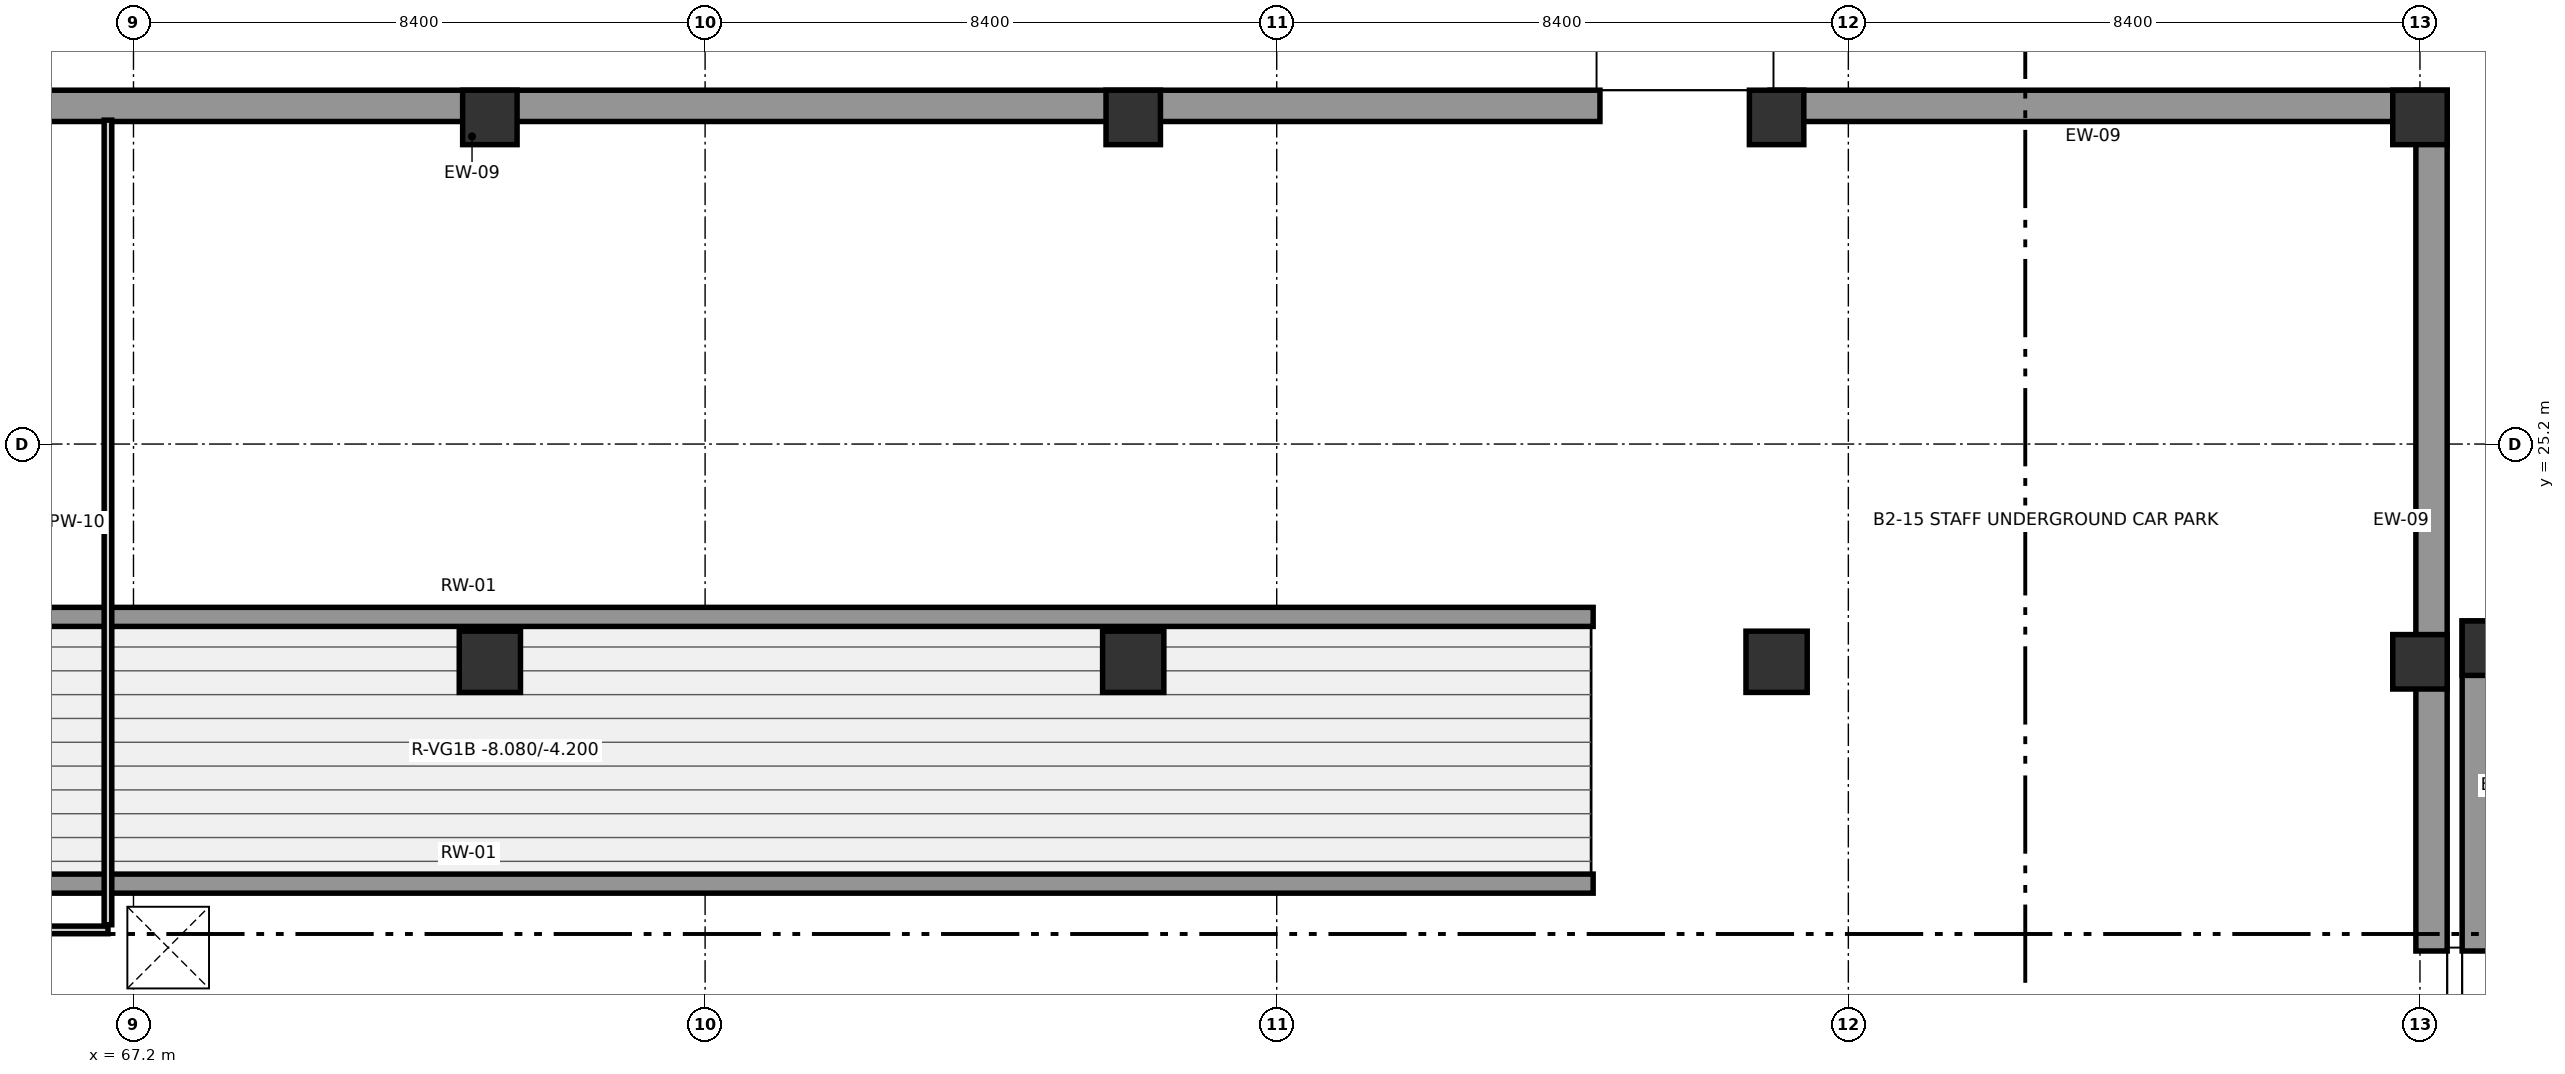
"""IFC4 building model, lengths in metres.
Left out: names, types, materials, properties, quantities, classifications, styles, units other than length and angle.
Written with IfcOpenShell. Run it as: python <this file> out.ifc"""

import sys

from ifc_helpers import new_model, si_unit, direction, frame, frame_2d, origin, origin_2d, place, context, subcontext, project, spatial, rectangle, extrude, element, save


model = new_model("IFC4")
c1 = context("Model", 3, precision=1e-05, world=origin(), true_north=direction((0.0, 1.0)))
c2 = subcontext(c1, "Body", "Model", "MODEL_VIEW")
j1 = project(units=[si_unit("LENGTHUNIT", "METRE"), si_unit("PLANEANGLEUNIT", "RADIAN")], contexts=[c1])
p1 = place(None, origin())
s1 = spatial("IfcSite", under=j1, at=p1, CompositionType="ELEMENT")
p2 = place(p1, origin())
s2 = spatial("IfcBuilding", under=s1, at=p2, CompositionType="ELEMENT")
p3 = place(p2, frame((0.0, 0.0, -8.4)))
s3 = spatial("IfcBuildingStorey", under=s2, at=p3, CompositionType="ELEMENT", Elevation=-8.4)
p4 = place(p3, frame((72.437, 22.0, 0.0), z_axis=(0.0, 0.0, 1.0), x_axis=(1.0, 0.0, 0.0)))
e1 = element("IfcColumn", 1, at=p4, inside=s3, PredefinedType="COLUMN", context=c2, shape_type="SweptSolid", body=[
    extrude(rectangle(XDim=0.9, YDim=0.9, at=origin_2d()), origin(), (0.0, 0.0, 1.0), 4.2),
])
p5 = place(p3, frame((72.437, 30.0, 0.0), z_axis=(0.0, 0.0, 1.0), x_axis=(1.0, 0.0, 0.0)))
e2 = element("IfcColumn", 2, at=p5, inside=s3, PredefinedType="COLUMN", context=c2, shape_type="SweptSolid", body=[
    extrude(rectangle(XDim=0.8, YDim=0.8, at=origin_2d()), origin(), (0.0, 0.0, 1.0), 4.2),
])
p6 = place(p3, frame((81.891, 22.0, 0.0), z_axis=(0.0, 0.0, 1.0), x_axis=(1.0, 0.0, 0.0)))
e3 = element("IfcColumn", 3, at=p6, inside=s3, PredefinedType="COLUMN", context=c2, shape_type="SweptSolid", body=[
    extrude(rectangle(XDim=0.9, YDim=0.9, at=origin_2d()), origin(), (0.0, 0.0, 1.0), 4.2),
])
p7 = place(p3, frame((81.891, 30.0, 0.0), z_axis=(0.0, 0.0, 1.0), x_axis=(1.0, 0.0, 0.0)))
e4 = element("IfcColumn", 4, at=p7, inside=s3, PredefinedType="COLUMN", context=c2, shape_type="SweptSolid", body=[
    extrude(rectangle(XDim=0.8, YDim=0.8, at=origin_2d()), origin(), (0.0, 0.0, 1.0), 4.2),
])
p8 = place(p3, frame((91.346, 22.0, 0.0), z_axis=(0.0, 0.0, 1.0), x_axis=(1.0, 0.0, 0.0)))
e5 = element("IfcColumn", 5, at=p8, inside=s3, PredefinedType="COLUMN", context=c2, shape_type="SweptSolid", body=[
    extrude(rectangle(XDim=0.9, YDim=0.9, at=origin_2d()), origin(), (0.0, 0.0, 1.0), 4.2),
])
for number, where, z_axis, x_axis in (
    (6, (91.346, 30.0, 0.0), (0.0, 0.0, 1.0), (1.0, 0.0, 0.0)),
    (7, (100.8, 22.0, 0.0), (0.0, 0.0, 1.0), (1.0, 0.0, 0.0)),
    (8, (100.8, 30.0, 0.0), (0.0, 0.0, 1.0), (1.0, 0.0, 0.0)),
    (9, (101.82, 22.2, 0.0), (0.0, 0.0, 1.0), (1.0, 0.0, 0.0)),
):
    element("IfcColumn", number, at=place(p3, frame(where, z_axis=z_axis, x_axis=x_axis)), inside=s3, PredefinedType="COLUMN", context=c2, shape_type="SweptSolid", body=[
        extrude(rectangle(XDim=0.8, YDim=0.8, at=origin_2d()), origin(), (0.0, 0.0, 1.0), 4.2),
    ])
p9 = place(p3, frame((100.97, 17.75, 0.0), z_axis=(0.0, 0.0, 1.0), x_axis=(0.0, 1.0, 0.0)))
e10 = element("IfcWall", 10, at=p9, inside=s3, PredefinedType="SOLIDWALL", context=c2, shape_type="SweptSolid", body=[
    extrude(rectangle(XDim=12.65, YDim=0.46, at=frame_2d((6.325, 0.0))), origin(), (0.0, 0.0, 1.0), 4.2),
])
p10 = place(p3, frame((100.745, 30.17, 0.0), z_axis=(0.0, 0.0, 1.0), x_axis=(-1.0, 0.0, 0.0)))
e11 = element("IfcWall", 11, at=p10, inside=s3, PredefinedType="SOLIDWALL", context=c2, shape_type="SweptSolid", body=[
    extrude(rectangle(XDim=9.495, YDim=0.46, at=frame_2d((4.748, 0.0))), origin(), (0.0, 0.0, 1.0), 4.2),
])
p11 = place(p3, frame((88.75, 30.17, 0.0), z_axis=(0.0, 0.0, 1.0), x_axis=(-1.0, 0.0, 0.0)))
e12 = element("IfcWall", 12, at=p11, inside=s3, PredefinedType="SOLIDWALL", context=c2, shape_type="SweptSolid", body=[
    extrude(rectangle(XDim=54.075, YDim=0.46, at=frame_2d((27.038, 0.0))), origin(), (0.0, 0.0, 1.0), 4.2),
])
p12 = place(p3, frame((101.65, 22.6, 0.0), z_axis=(0.0, 0.0, 1.0), x_axis=(0.0, -1.0, 0.0)))
e13 = element("IfcWall", 13, at=p12, inside=s3, PredefinedType="SOLIDWALL", context=c2, shape_type="SweptSolid", body=[
    extrude(rectangle(XDim=4.85, YDim=0.46, at=frame_2d((2.425, 0.0))), origin(), (0.0, 0.0, 1.0), 4.2),
])
for number, where, z_axis, x_axis in (
    (14, (54.0, 18.74, 0.0), (0.0, 0.0, 1.0), (1.0, 0.0, 0.0)),
    (15, (54.0, 22.66, 0.0), (0.0, 0.0, 1.0), (1.0, 0.0, 0.0)),
):
    element("IfcWall", number, at=place(p3, frame(where, z_axis=z_axis, x_axis=x_axis)), inside=s3, PredefinedType="SOLIDWALL", context=c2, shape_type="SweptSolid", body=[
        extrude(rectangle(XDim=34.65, YDim=0.28, at=frame_2d((17.325, 0.0))), origin(), (0.0, 0.0, 1.0), 4.2),
    ])
p13 = place(p3, frame((34.6, 18.06, 0.0), z_axis=(0.0, 0.0, 1.0), x_axis=(1.0, 0.0, 0.0)))
e16 = element("IfcWall", 16, at=p13, inside=s3, PredefinedType="PARTITIONING", context=c2, shape_type="SweptSolid", body=[
    extrude(rectangle(XDim=32.225, YDim=0.112, at=frame_2d((16.112, 0.0))), origin(), (0.0, 0.0, 1.0), 3.88),
])
p14 = place(p13, frame((15.643, 0.0, 0.0)))
e17 = element("IfcOpeningElement", 17, at=p14, cuts=e16, PredefinedType="OPENING", context=c2, shape_type="SweptSolid", body=[
    extrude(rectangle(XDim=0.94, YDim=2.07, at=frame_2d((0.47, 1.035))), frame((0.0, 0.071, 0.0), z_axis=(0.0, -1.0, 0.0), x_axis=(1.0, 0.0, 0.0)), (0.0, 0.0, 1.0), 0.142),
])
p15 = place(p3, frame((66.825, 18.136, 0.0), z_axis=(0.0, 0.0, 1.0), x_axis=(0.0, 1.0, 0.0)))
e18 = element("IfcWall", 18, at=p15, inside=s3, PredefinedType="PARTITIONING", context=c2, shape_type="SweptSolid", body=[
    extrude(rectangle(XDim=11.824, YDim=0.112, at=frame_2d((5.912, 0.0))), origin(), (0.0, 0.0, 1.0), 3.88),
])
save(model, sys.argv[1])
